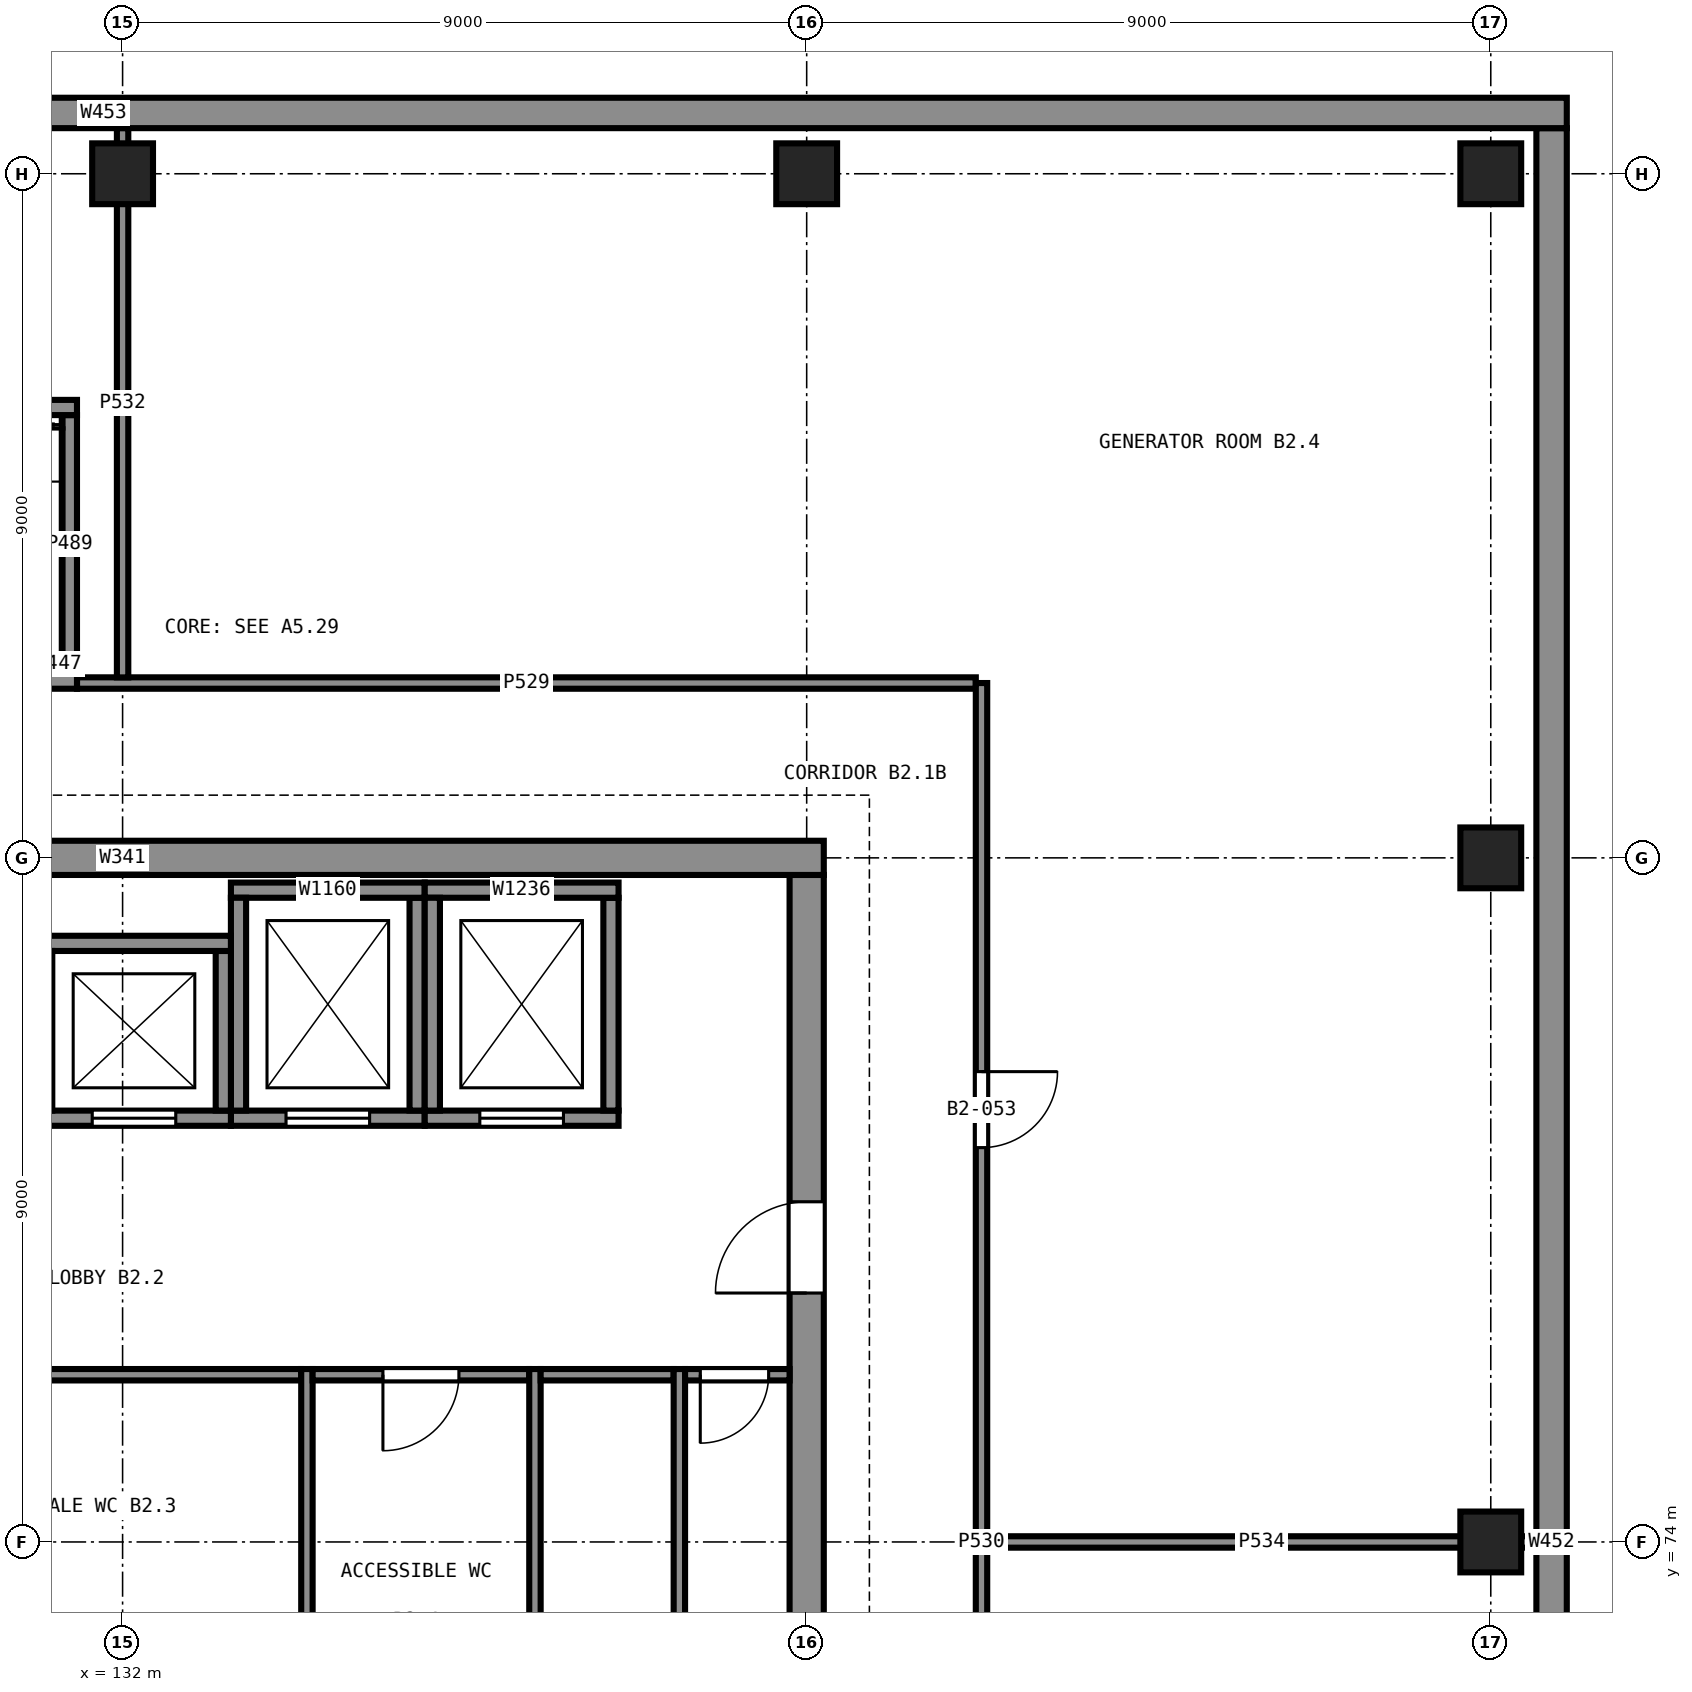
"""IFC4 building model, lengths in metres.
Left out: names, types, materials, properties, quantities, classifications, styles, units other than length and angle.
Written with IfcOpenShell. Run it as: python <this file> out.ifc"""

import sys

from ifc_helpers import new_model, si_unit, direction, frame, frame_2d, origin, origin_2d, place, context, subcontext, project, spatial, rectangle, extrude, element, fill, save


model = new_model("IFC4")
c1 = context("Model", 3, precision=1e-05, world=origin(), true_north=direction((0.0, 1.0)))
c2 = subcontext(c1, "Body", "Model", "MODEL_VIEW")
j1 = project(units=[si_unit("LENGTHUNIT", "METRE"), si_unit("PLANEANGLEUNIT", "RADIAN")], contexts=[c1])
p1 = place(None, origin())
s1 = spatial("IfcSite", under=j1, at=p1, CompositionType="ELEMENT")
p2 = place(p1, origin())
s2 = spatial("IfcBuilding", under=s1, at=p2, CompositionType="ELEMENT")
p3 = place(p2, frame((0.0, 0.0, -10.0)))
s3 = spatial("IfcBuildingStorey", under=s2, at=p3, CompositionType="ELEMENT", Elevation=-10.0)
for number, where, z_axis, x_axis in (
    (1, (132.0, 92.0, 0.0), (0.0, 0.0, 1.0), (1.0, 0.0, 0.0)),
    (2, (141.0, 92.0, 0.0), (0.0, 0.0, 1.0), (1.0, 0.0, 0.0)),
    (3, (150.0, 74.0, 0.0), (0.0, 0.0, 1.0), (1.0, 0.0, 0.0)),
    (4, (150.0, 83.0, 0.0), (0.0, 0.0, 1.0), (1.0, 0.0, 0.0)),
    (5, (150.0, 92.0, 0.0), (0.0, 0.0, 1.0), (1.0, 0.0, 0.0)),
):
    element("IfcColumn", number, at=place(p3, frame(where, z_axis=z_axis, x_axis=x_axis)), inside=s3, PredefinedType="COLUMN", context=c2, shape_type="SweptSolid", body=[
        extrude(rectangle(XDim=0.8, YDim=0.8, at=origin_2d()), origin(), (0.0, 0.0, 1.0), 5.0),
    ])
p4 = place(p3, frame((141.0, 65.225, 0.0), z_axis=(0.0, 0.0, 1.0), x_axis=(0.0, 1.0, 0.0)))
e6 = element("IfcWall", 6, at=p4, inside=s3, PredefinedType="SHEAR", context=c2, shape_type="SweptSolid", body=[
    extrude(rectangle(XDim=17.55, YDim=0.45, at=frame_2d((8.775, 0.0))), origin(), (0.0, 0.0, 1.0), 5.0),
])
p5 = place(p4, frame((4.3, 0.0, 0.0)))
e7 = element("IfcOpeningElement", 7, at=p5, cuts=e6, PredefinedType="OPENING", context=c2, shape_type="SweptSolid", body=[
    extrude(rectangle(XDim=1.2, YDim=2.1, at=frame_2d((0.6, 1.05))), frame((0.0, 0.235, 0.0), z_axis=(0.0, -1.0, 0.0), x_axis=(1.0, 0.0, 0.0)), (0.0, 0.0, 1.0), 0.47),
])
p6 = place(p4, frame((12.05, 0.0, 0.0)))
e8 = element("IfcOpeningElement", 8, at=p6, cuts=e6, PredefinedType="OPENING", context=c2, shape_type="SweptSolid", body=[
    extrude(rectangle(XDim=1.2, YDim=2.1, at=frame_2d((0.6, 1.05))), frame((0.0, 0.235, 0.0), z_axis=(0.0, -1.0, 0.0), x_axis=(1.0, 0.0, 0.0)), (0.0, 0.0, 1.0), 0.47),
])
p7 = place(p3, frame((141.225, 83.0, 0.0), z_axis=(0.0, 0.0, 1.0), x_axis=(-1.0, 0.0, 0.0)))
e9 = element("IfcWall", 9, at=p7, inside=s3, PredefinedType="SHEAR", context=c2, shape_type="SweptSolid", body=[
    extrude(rectangle(XDim=18.45, YDim=0.45, at=frame_2d((9.225, 0.0))), origin(), (0.0, 0.0, 1.0), 5.0),
])
p8 = place(p3, frame((150.8, 55.4, 0.0), z_axis=(0.0, 0.0, 1.0), x_axis=(0.0, 1.0, 0.0)))
e10 = element("IfcWall", 10, at=p8, inside=s3, PredefinedType="SOLIDWALL", context=c2, shape_type="SweptSolid", body=[
    extrude(rectangle(XDim=37.2, YDim=0.4, at=frame_2d((18.6, 0.0))), origin(), (0.0, 0.0, 1.0), 4.7),
])
p9 = place(p3, frame((151.0, 92.8, 0.0), z_axis=(0.0, 0.0, 1.0), x_axis=(-1.0, 0.0, 0.0)))
e11 = element("IfcWall", 11, at=p9, inside=s3, PredefinedType="SOLIDWALL", context=c2, shape_type="SweptSolid", body=[
    extrude(rectangle(XDim=38.5, YDim=0.4, at=frame_2d((19.25, 0.0))), origin(), (0.0, 0.0, 1.0), 4.7),
])
p10 = place(p3, frame((130.875, 79.575, -1.9), z_axis=(0.0, 0.0, 1.0), x_axis=(1.0, 0.0, 0.0)))
e12 = element("IfcWall", 12, at=p10, inside=s3, PredefinedType="SHEAR", context=c2, shape_type="SweptSolid", body=[
    extrude(rectangle(XDim=2.55, YDim=0.2, at=frame_2d((1.275, 0.0))), origin(), (0.0, 0.0, 1.0), 6.9),
])
p11 = place(p10, frame((0.725, 0.0, 1.9)))
e13 = element("IfcOpeningElement", 13, at=p11, cuts=e12, PredefinedType="OPENING", context=c2, shape_type="SweptSolid", body=[
    extrude(rectangle(XDim=1.1, YDim=2.1, at=frame_2d((0.55, 1.05))), frame((0.0, 0.11, 0.0), z_axis=(0.0, -1.0, 0.0), x_axis=(1.0, 0.0, 0.0)), (0.0, 0.0, 1.0), 0.22),
])
p12 = place(p3, frame((133.325, 79.675, -1.9), z_axis=(0.0, 0.0, 1.0), x_axis=(0.0, 1.0, 0.0)))
e14 = element("IfcWall", 14, at=p12, inside=s3, PredefinedType="SHEAR", context=c2, shape_type="SweptSolid", body=[
    extrude(rectangle(XDim=2.1, YDim=0.2, at=frame_2d((1.05, 0.0))), origin(), (0.0, 0.0, 1.0), 6.9),
])
p13 = place(p3, frame((133.425, 81.875, -1.9), z_axis=(0.0, 0.0, 1.0), x_axis=(-1.0, 0.0, 0.0)))
e15 = element("IfcWall", 15, at=p13, inside=s3, PredefinedType="SHEAR", context=c2, shape_type="SweptSolid", body=[
    extrude(rectangle(XDim=2.55, YDim=0.2, at=frame_2d((1.275, 0.0))), origin(), (0.0, 0.0, 1.0), 6.9),
])
p14 = place(p3, frame((130.975, 81.775, -1.9), z_axis=(0.0, 0.0, 1.0), x_axis=(0.0, -1.0, 0.0)))
e16 = element("IfcWall", 16, at=p14, inside=s3, PredefinedType="SHEAR", context=c2, shape_type="SweptSolid", body=[
    extrude(rectangle(XDim=2.1, YDim=0.2, at=frame_2d((1.05, 0.0))), origin(), (0.0, 0.0, 1.0), 6.9),
])
p15 = place(p3, frame((133.425, 79.575, -1.9), z_axis=(0.0, 0.0, 1.0), x_axis=(1.0, 0.0, 0.0)))
e17 = element("IfcWall", 17, at=p15, inside=s3, PredefinedType="SHEAR", context=c2, shape_type="SweptSolid", body=[
    extrude(rectangle(XDim=2.55, YDim=0.2, at=frame_2d((1.275, 0.0))), origin(), (0.0, 0.0, 1.0), 6.9),
])
p16 = place(p15, frame((0.725, 0.0, 1.9)))
e18 = element("IfcOpeningElement", 18, at=p16, cuts=e17, PredefinedType="OPENING", context=c2, shape_type="SweptSolid", body=[
    extrude(rectangle(XDim=1.1, YDim=2.1, at=frame_2d((0.55, 1.05))), frame((0.0, 0.11, 0.0), z_axis=(0.0, -1.0, 0.0), x_axis=(1.0, 0.0, 0.0)), (0.0, 0.0, 1.0), 0.22),
])
p17 = place(p3, frame((135.875, 79.675, -1.9), z_axis=(0.0, 0.0, 1.0), x_axis=(0.0, 1.0, 0.0)))
e19 = element("IfcWall", 19, at=p17, inside=s3, PredefinedType="SHEAR", context=c2, shape_type="SweptSolid", body=[
    extrude(rectangle(XDim=2.8, YDim=0.2, at=frame_2d((1.4, 0.0))), origin(), (0.0, 0.0, 1.0), 6.9),
])
p18 = place(p3, frame((135.975, 82.575, -1.9), z_axis=(0.0, 0.0, 1.0), x_axis=(-1.0, 0.0, 0.0)))
e20 = element("IfcWall", 20, at=p18, inside=s3, PredefinedType="SHEAR", context=c2, shape_type="SweptSolid", body=[
    extrude(rectangle(XDim=2.55, YDim=0.2, at=frame_2d((1.275, 0.0))), origin(), (0.0, 0.0, 1.0), 6.9),
])
p19 = place(p3, frame((133.525, 82.475, -1.9), z_axis=(0.0, 0.0, 1.0), x_axis=(0.0, -1.0, 0.0)))
e21 = element("IfcWall", 21, at=p19, inside=s3, PredefinedType="SHEAR", context=c2, shape_type="SweptSolid", body=[
    extrude(rectangle(XDim=2.8, YDim=0.2, at=frame_2d((1.4, 0.0))), origin(), (0.0, 0.0, 1.0), 6.9),
])
p20 = place(p3, frame((135.975, 79.575, -1.9), z_axis=(0.0, 0.0, 1.0), x_axis=(1.0, 0.0, 0.0)))
e22 = element("IfcWall", 22, at=p20, inside=s3, PredefinedType="SHEAR", context=c2, shape_type="SweptSolid", body=[
    extrude(rectangle(XDim=2.55, YDim=0.2, at=frame_2d((1.275, 0.0))), origin(), (0.0, 0.0, 1.0), 6.9),
])
p21 = place(p20, frame((0.725, 0.0, 1.9)))
e23 = element("IfcOpeningElement", 23, at=p21, cuts=e22, PredefinedType="OPENING", context=c2, shape_type="SweptSolid", body=[
    extrude(rectangle(XDim=1.1, YDim=2.1, at=frame_2d((0.55, 1.05))), frame((0.0, 0.11, 0.0), z_axis=(0.0, -1.0, 0.0), x_axis=(1.0, 0.0, 0.0)), (0.0, 0.0, 1.0), 0.22),
])
p22 = place(p3, frame((138.425, 79.675, -1.9), z_axis=(0.0, 0.0, 1.0), x_axis=(0.0, 1.0, 0.0)))
e24 = element("IfcWall", 24, at=p22, inside=s3, PredefinedType="SHEAR", context=c2, shape_type="SweptSolid", body=[
    extrude(rectangle(XDim=2.8, YDim=0.2, at=frame_2d((1.4, 0.0))), origin(), (0.0, 0.0, 1.0), 6.9),
])
p23 = place(p3, frame((138.525, 82.575, -1.9), z_axis=(0.0, 0.0, 1.0), x_axis=(-1.0, 0.0, 0.0)))
e25 = element("IfcWall", 25, at=p23, inside=s3, PredefinedType="SHEAR", context=c2, shape_type="SweptSolid", body=[
    extrude(rectangle(XDim=2.55, YDim=0.2, at=frame_2d((1.275, 0.0))), origin(), (0.0, 0.0, 1.0), 6.9),
])
p24 = place(p3, frame((136.075, 82.475, -1.9), z_axis=(0.0, 0.0, 1.0), x_axis=(0.0, -1.0, 0.0)))
e26 = element("IfcWall", 26, at=p24, inside=s3, PredefinedType="SHEAR", context=c2, shape_type="SweptSolid", body=[
    extrude(rectangle(XDim=2.8, YDim=0.2, at=frame_2d((1.4, 0.0))), origin(), (0.0, 0.0, 1.0), 6.9),
])
p25 = place(p3, frame((123.6, 85.325, 0.0), z_axis=(0.0, 0.0, 1.0), x_axis=(1.0, 0.0, 0.0)))
e27 = element("IfcWall", 27, at=p25, inside=s3, PredefinedType="SHEAR", context=c2, shape_type="SweptSolid", body=[
    extrude(rectangle(XDim=7.8, YDim=0.2, at=frame_2d((3.9, 0.0))), origin(), (0.0, 0.0, 1.0), 4.7),
])
p26 = place(p25, frame((0.6, 0.0, 0.0)))
e28 = element("IfcOpeningElement", 28, at=p26, cuts=e27, PredefinedType="OPENING", context=c2, shape_type="SweptSolid", body=[
    extrude(rectangle(XDim=1.0, YDim=2.1, at=frame_2d((0.5, 1.05))), frame((0.0, 0.11, 0.0), z_axis=(0.0, -1.0, 0.0), x_axis=(1.0, 0.0, 0.0)), (0.0, 0.0, 1.0), 0.22),
])
p27 = place(p3, frame((131.3, 85.425, 0.0), z_axis=(0.0, 0.0, 1.0), x_axis=(0.0, 1.0, 0.0)))
e29 = element("IfcWall", 29, at=p27, inside=s3, PredefinedType="SHEAR", context=c2, shape_type="SweptSolid", body=[
    extrude(rectangle(XDim=3.4, YDim=0.2, at=frame_2d((1.7, 0.0))), origin(), (0.0, 0.0, 1.0), 4.7),
])
p28 = place(p3, frame((131.4, 88.925, 0.0), z_axis=(0.0, 0.0, 1.0), x_axis=(-1.0, 0.0, 0.0)))
e30 = element("IfcWall", 30, at=p28, inside=s3, PredefinedType="SHEAR", context=c2, shape_type="SweptSolid", body=[
    extrude(rectangle(XDim=7.8, YDim=0.2, at=frame_2d((3.9, 0.0))), origin(), (0.0, 0.0, 1.0), 4.7),
])
p29 = place(p3, frame((134.425, 71.725, 0.0), z_axis=(0.0, 0.0, 1.0), x_axis=(0.0, 1.0, 0.0)))
e31 = element("IfcWall", 31, at=p29, inside=s3, PredefinedType="PARTITIONING", context=c2, shape_type="SweptSolid", body=[
    extrude(rectangle(XDim=4.55, YDim=0.15, at=frame_2d((2.275, 0.0))), origin(), (0.0, 0.0, 1.0), 4.7),
])
p30 = place(p3, frame((130.3, 76.2, 0.0), z_axis=(0.0, 0.0, 1.0), x_axis=(1.0, 0.0, 0.0)))
e32 = element("IfcWall", 32, at=p30, inside=s3, PredefinedType="PARTITIONING", context=c2, shape_type="SweptSolid", body=[
    extrude(rectangle(XDim=4.05, YDim=0.15, at=frame_2d((2.025, 0.0))), origin(), (0.0, 0.0, 1.0), 4.7),
])
p31 = place(p3, frame((137.425, 71.725, 0.0), z_axis=(0.0, 0.0, 1.0), x_axis=(0.0, 1.0, 0.0)))
e33 = element("IfcWall", 33, at=p31, inside=s3, PredefinedType="PARTITIONING", context=c2, shape_type="SweptSolid", body=[
    extrude(rectangle(XDim=4.55, YDim=0.15, at=frame_2d((2.275, 0.0))), origin(), (0.0, 0.0, 1.0), 4.7),
])
p32 = place(p3, frame((134.5, 76.2, 0.0), z_axis=(0.0, 0.0, 1.0), x_axis=(1.0, 0.0, 0.0)))
e34 = element("IfcWall", 34, at=p32, inside=s3, PredefinedType="PARTITIONING", context=c2, shape_type="SweptSolid", body=[
    extrude(rectangle(XDim=2.85, YDim=0.15, at=frame_2d((1.425, 0.0))), origin(), (0.0, 0.0, 1.0), 4.7),
])
p33 = place(p32, frame((0.925, 0.0, 0.0)))
e35 = element("IfcOpeningElement", 35, at=p33, cuts=e34, PredefinedType="OPENING", context=c2, shape_type="SweptSolid", body=[
    extrude(rectangle(XDim=1.0, YDim=2.1, at=frame_2d((0.5, 1.05))), frame((0.0, 0.085, 0.0), z_axis=(0.0, -1.0, 0.0), x_axis=(1.0, 0.0, 0.0)), (0.0, 0.0, 1.0), 0.17),
])
p34 = place(p3, frame((139.325, 71.725, 0.0), z_axis=(0.0, 0.0, 1.0), x_axis=(0.0, 1.0, 0.0)))
e36 = element("IfcWall", 36, at=p34, inside=s3, PredefinedType="PARTITIONING", context=c2, shape_type="SweptSolid", body=[
    extrude(rectangle(XDim=4.55, YDim=0.15, at=frame_2d((2.275, 0.0))), origin(), (0.0, 0.0, 1.0), 4.7),
])
p35 = place(p3, frame((137.5, 76.2, 0.0), z_axis=(0.0, 0.0, 1.0), x_axis=(1.0, 0.0, 0.0)))
e37 = element("IfcWall", 37, at=p35, inside=s3, PredefinedType="PARTITIONING", context=c2, shape_type="SweptSolid", body=[
    extrude(rectangle(XDim=1.75, YDim=0.15, at=frame_2d((0.875, 0.0))), origin(), (0.0, 0.0, 1.0), 4.7),
])
p36 = place(p3, frame((139.4, 76.2, 0.0), z_axis=(0.0, 0.0, 1.0), x_axis=(1.0, 0.0, 0.0)))
e38 = element("IfcWall", 38, at=p36, inside=s3, PredefinedType="PARTITIONING", context=c2, shape_type="SweptSolid", body=[
    extrude(rectangle(XDim=1.375, YDim=0.15, at=frame_2d((0.688, 0.0))), origin(), (0.0, 0.0, 1.0), 4.7),
])
p37 = place(p36, frame((0.2, 0.0, 0.0)))
e39 = element("IfcOpeningElement", 39, at=p37, cuts=e38, PredefinedType="OPENING", context=c2, shape_type="SweptSolid", body=[
    extrude(rectangle(XDim=0.9, YDim=2.1, at=frame_2d((0.45, 1.05))), frame((0.0, 0.085, 0.0), z_axis=(0.0, -1.0, 0.0), x_axis=(1.0, 0.0, 0.0)), (0.0, 0.0, 1.0), 0.17),
])
p38 = place(p3, frame((131.4, 85.3, 0.0), z_axis=(0.0, 0.0, 1.0), x_axis=(1.0, 0.0, 0.0)))
e40 = element("IfcWall", 40, at=p38, inside=s3, PredefinedType="PARTITIONING", context=c2, shape_type="SweptSolid", body=[
    extrude(rectangle(XDim=11.825, YDim=0.15, at=frame_2d((5.913, 0.0))), origin(), (0.0, 0.0, 1.0), 4.7),
])
p39 = place(p3, frame((143.3, 85.3, 0.0), z_axis=(0.0, 0.0, 1.0), x_axis=(0.0, -1.0, 0.0)))
e41 = element("IfcWall", 41, at=p39, inside=s3, PredefinedType="PARTITIONING", context=c2, shape_type="SweptSolid", body=[
    extrude(rectangle(XDim=22.6, YDim=0.15, at=frame_2d((11.3, 0.0))), origin(), (0.0, 0.0, 1.0), 4.7),
])
p40 = place(p39, frame((16.488, 0.0, 0.0)))
e42 = element("IfcOpeningElement", 42, at=p40, cuts=e41, PredefinedType="OPENING", context=c2, shape_type="SweptSolid", body=[
    extrude(rectangle(XDim=1.0, YDim=2.1, at=frame_2d((0.5, 1.05))), frame((0.0, 0.085, 0.0), z_axis=(0.0, -1.0, 0.0), x_axis=(1.0, 0.0, 0.0)), (0.0, 0.0, 1.0), 0.17),
])
p41 = place(p39, frame((5.113, 0.0, 0.0)))
e43 = element("IfcOpeningElement", 43, at=p41, cuts=e41, PredefinedType="OPENING", context=c2, shape_type="SweptSolid", body=[
    extrude(rectangle(XDim=1.0, YDim=2.1, at=frame_2d((0.5, 1.05))), frame((0.0, 0.085, 0.0), z_axis=(0.0, -1.0, 0.0), x_axis=(1.0, 0.0, 0.0)), (0.0, 0.0, 1.0), 0.17),
])
for number, where, z_axis, x_axis in (
    (44, (132.0, 85.374, 0.0), (0.0, 0.0, 1.0), (0.0, 1.0, 0.0)),
    (45, (143.374, 74.0, 0.0), (0.0, 0.0, 1.0), (1.0, 0.0, 0.0)),
):
    element("IfcWall", number, at=place(p3, frame(where, z_axis=z_axis, x_axis=x_axis)), inside=s3, PredefinedType="PARTITIONING", context=c2, shape_type="SweptSolid", body=[
        extrude(rectangle(XDim=7.227, YDim=0.15, at=frame_2d((3.614, 0.0))), origin(), (0.0, 0.0, 1.0), 3.8),
    ])
p42 = place(p11, origin())
e46 = element("IfcDoor", 46, at=p42, inside=s3, OperationType="SLIDING_TO_LEFT", PredefinedType="DOOR", context=c2, shape_type="SweptSolid", body=[
    extrude(rectangle(XDim=1.1, YDim=2.1, at=frame_2d((0.55, 1.05))), frame((0.0, 0.025, 0.0), z_axis=(0.0, -1.0, 0.0), x_axis=(1.0, 0.0, 0.0)), (0.0, 0.0, 1.0), 0.05),
])
fill(e13, e46)
p43 = place(p16, origin())
e47 = element("IfcDoor", 47, at=p43, inside=s3, OperationType="SLIDING_TO_LEFT", PredefinedType="DOOR", context=c2, shape_type="SweptSolid", body=[
    extrude(rectangle(XDim=1.1, YDim=2.1, at=frame_2d((0.55, 1.05))), frame((0.0, 0.025, 0.0), z_axis=(0.0, -1.0, 0.0), x_axis=(1.0, 0.0, 0.0)), (0.0, 0.0, 1.0), 0.05),
])
fill(e18, e47)
p44 = place(p21, origin())
e48 = element("IfcDoor", 48, at=p44, inside=s3, OperationType="SLIDING_TO_LEFT", PredefinedType="DOOR", context=c2, shape_type="SweptSolid", body=[
    extrude(rectangle(XDim=1.1, YDim=2.1, at=frame_2d((0.55, 1.05))), frame((0.0, 0.025, 0.0), z_axis=(0.0, -1.0, 0.0), x_axis=(1.0, 0.0, 0.0)), (0.0, 0.0, 1.0), 0.05),
])
fill(e23, e48)
p45 = place(p6, origin())
e49 = element("IfcDoor", 49, at=p45, inside=s3, OperationType="SINGLE_SWING_RIGHT", PredefinedType="DOOR", context=c2, shape_type="SweptSolid", body=[
    extrude(rectangle(XDim=1.2, YDim=2.1, at=frame_2d((0.6, 1.05))), frame((0.0, 0.025, 0.0), z_axis=(0.0, -1.0, 0.0), x_axis=(1.0, 0.0, 0.0)), (0.0, 0.0, 1.0), 0.05),
])
fill(e8, e49)
p46 = place(p33, frame((1.0, 0.0, 0.0), z_axis=(0.0, 0.0, 1.0), x_axis=(-1.0, 0.0, 0.0)))
e50 = element("IfcDoor", 50, at=p46, inside=s3, OperationType="SINGLE_SWING_LEFT", PredefinedType="DOOR", context=c2, shape_type="SweptSolid", body=[
    extrude(rectangle(XDim=1.0, YDim=2.1, at=frame_2d((0.5, 1.05))), frame((0.0, 0.025, 0.0), z_axis=(0.0, -1.0, 0.0), x_axis=(1.0, 0.0, 0.0)), (0.0, 0.0, 1.0), 0.05),
])
fill(e35, e50)
p47 = place(p37, frame((0.9, 0.0, 0.0), z_axis=(0.0, 0.0, 1.0), x_axis=(-1.0, 0.0, 0.0)))
e51 = element("IfcDoor", 51, at=p47, inside=s3, OperationType="SINGLE_SWING_LEFT", PredefinedType="DOOR", context=c2, shape_type="SweptSolid", body=[
    extrude(rectangle(XDim=0.9, YDim=2.1, at=frame_2d((0.45, 1.05))), frame((0.0, 0.025, 0.0), z_axis=(0.0, -1.0, 0.0), x_axis=(1.0, 0.0, 0.0)), (0.0, 0.0, 1.0), 0.05),
])
fill(e39, e51)
p48 = place(p41, origin())
e52 = element("IfcDoor", 52, at=p48, inside=s3, OperationType="SINGLE_SWING_RIGHT", PredefinedType="DOOR", context=c2, shape_type="SweptSolid", body=[
    extrude(rectangle(XDim=1.0, YDim=2.1, at=frame_2d((0.5, 1.05))), frame((0.0, 0.025, 0.0), z_axis=(0.0, -1.0, 0.0), x_axis=(1.0, 0.0, 0.0)), (0.0, 0.0, 1.0), 0.05),
])
fill(e43, e52)
save(model, sys.argv[1])
